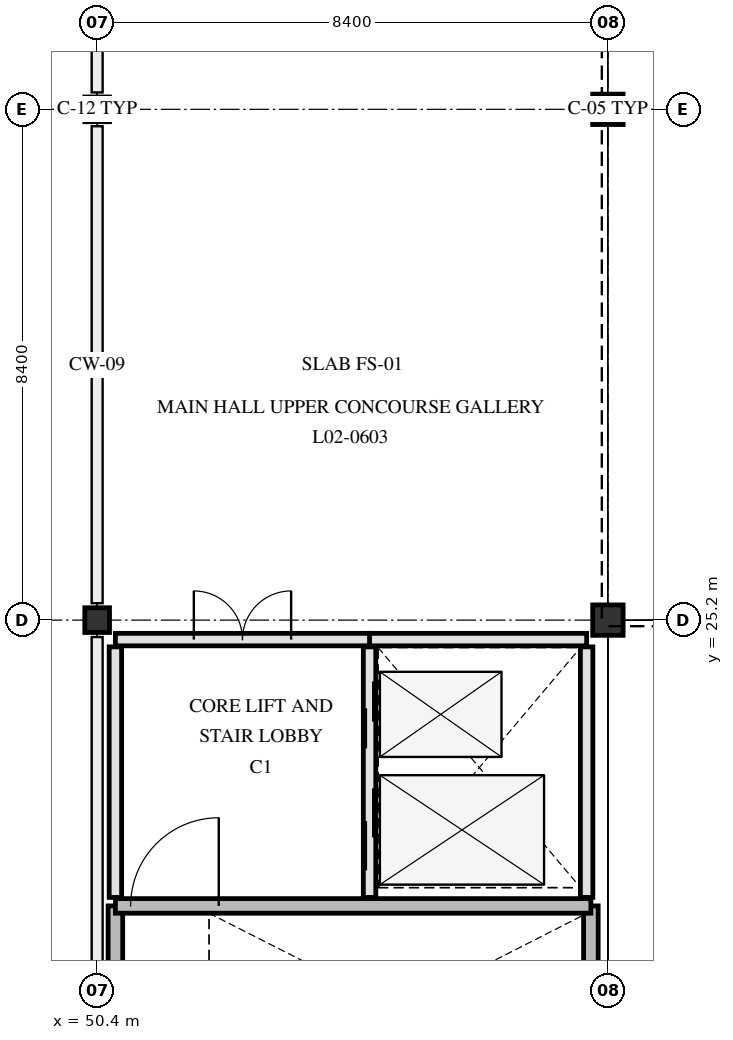
"""IFC4 building model, lengths in metres.
Left out: names, types, materials, properties, quantities, classifications, styles, units other than length and angle.
Written with IfcOpenShell. Run it as: python <this file> out.ifc"""

import sys

from ifc_helpers import new_model, si_unit, direction, frame, frame_2d, origin, origin_2d, place, context, subcontext, project, spatial, rectangle, hollow_circle, extrude, element, fill, save


model = new_model("IFC4")
c1 = context("Model", 3, precision=1e-05, world=origin(), true_north=direction((0.0, 1.0)))
c2 = subcontext(c1, "Body", "Model", "MODEL_VIEW")
j1 = project(units=[si_unit("LENGTHUNIT", "METRE"), si_unit("PLANEANGLEUNIT", "RADIAN")], contexts=[c1])
p1 = place(None, origin())
s1 = spatial("IfcSite", under=j1, at=p1, CompositionType="ELEMENT")
p2 = place(p1, origin())
s2 = spatial("IfcBuilding", under=s1, at=p2, CompositionType="ELEMENT")
p3 = place(p2, frame((0.0, 0.0, 9.3)))
s3 = spatial("IfcBuildingStorey", under=s2, at=p3, CompositionType="ELEMENT", Elevation=9.3)
for number, where, z_axis, x_axis in (
    (1, (50.4, 25.2, 0.0), (0.0, 0.0, 1.0), (1.0, 0.0, 0.0)),
    (2, (50.4, 33.6, 0.0), (0.0, 0.0, 1.0), (1.0, 0.0, 0.0)),
):
    element("IfcColumn", number, at=place(p3, frame(where, z_axis=z_axis, x_axis=x_axis)), inside=s3, PredefinedType="COLUMN", context=c2, shape_type="SweptSolid", body=[
        extrude(hollow_circle(Radius=0.203, WallThickness=0.016, at=origin_2d()), origin(), (0.0, 0.0, 1.0), 5.1),
    ])
for number, where, z_axis, x_axis in (
    (3, (58.8, 25.2, 0.0), (0.0, 0.0, 1.0), (1.0, 0.0, 0.0)),
    (4, (58.8, 33.6, 0.0), (0.0, 0.0, 1.0), (1.0, 0.0, 0.0)),
):
    element("IfcColumn", number, at=place(p3, frame(where, z_axis=z_axis, x_axis=x_axis)), inside=s3, PredefinedType="COLUMN", context=c2, shape_type="SweptSolid", body=[
        extrude(rectangle(XDim=0.5, YDim=0.5, at=origin_2d()), origin(), (0.0, 0.0, 1.0), 5.1),
    ])
for number, where, z_axis, x_axis in (
    (5, (50.7, 17.18, 0.0), (0.0, 0.0, 1.0), (0.0, 1.0, 0.0)),
    (6, (58.52, 17.18, 0.0), (0.0, 0.0, 1.0), (0.0, 1.0, 0.0)),
):
    element("IfcWall", number, at=place(p3, frame(where, z_axis=z_axis, x_axis=x_axis)), inside=s3, PredefinedType="SHEAR", context=c2, shape_type="SweptSolid", body=[
        extrude(rectangle(XDim=3.32, YDim=0.24, at=frame_2d((1.66, 0.0))), origin(), (0.0, 0.0, 1.0), 4.78),
    ])
p4 = place(p3, frame((50.7, 20.5, 0.0), z_axis=(0.0, 0.0, 1.0), x_axis=(1.0, 0.0, 0.0)))
e7 = element("IfcWall", 7, at=p4, inside=s3, PredefinedType="SHEAR", context=c2, shape_type="SweptSolid", body=[
    extrude(rectangle(XDim=7.82, YDim=0.24, at=frame_2d((3.91, 0.0))), origin(), (0.0, 0.0, 1.0), 4.78),
])
p5 = place(p4, frame((0.25, 0.0, 0.0)))
e8 = element("IfcOpeningElement", 8, at=p5, cuts=e7, PredefinedType="OPENING", context=c2, shape_type="SweptSolid", body=[
    extrude(rectangle(XDim=1.45, YDim=2.2, at=frame_2d((0.725, 1.1))), frame((0.0, 0.13, 0.0), z_axis=(0.0, -1.0, 0.0), x_axis=(1.0, 0.0, 0.0)), (0.0, 0.0, 1.0), 0.26),
])
p6 = place(p3, frame((54.88, 20.64, 0.0), z_axis=(0.0, 0.0, 1.0), x_axis=(0.0, 1.0, 0.0)))
e9 = element("IfcWall", 9, at=p6, inside=s3, PredefinedType="PARTITIONING", context=c2, shape_type="SweptSolid", body=[
    extrude(rectangle(XDim=4.12, YDim=0.205, at=frame_2d((2.06, 0.0))), origin(), (0.0, 0.0, 1.0), 4.77),
])
p7 = place(p6, frame((0.445, 0.0, 0.0)))
e10 = element("IfcOpeningElement", 10, at=p7, cuts=e9, PredefinedType="OPENING", context=c2, shape_type="SweptSolid", body=[
    extrude(rectangle(XDim=1.35, YDim=2.2, at=frame_2d((0.675, 1.1))), frame((0.0, 0.113, 0.0), z_axis=(0.0, -1.0, 0.0), x_axis=(1.0, 0.0, 0.0)), (0.0, 0.0, 1.0), 0.225),
])
p8 = place(p6, frame((2.45, 0.0, 0.0)))
e11 = element("IfcOpeningElement", 11, at=p8, cuts=e9, PredefinedType="OPENING", context=c2, shape_type="SweptSolid", body=[
    extrude(rectangle(XDim=1.1, YDim=2.15, at=frame_2d((0.55, 1.075))), frame((0.0, 0.113, 0.0), z_axis=(0.0, -1.0, 0.0), x_axis=(1.0, 0.0, 0.0)), (0.0, 0.0, 1.0), 0.225),
])
p9 = place(p3, frame((58.45, 20.64, 0.0), z_axis=(0.0, 0.0, 1.0), x_axis=(0.0, 1.0, 0.0)))
e12 = element("IfcWall", 12, at=p9, inside=s3, PredefinedType="PARTITIONING", context=c2, shape_type="SweptSolid", body=[
    extrude(rectangle(XDim=4.12, YDim=0.205, at=frame_2d((2.06, 0.0))), origin(), (0.0, 0.0, 1.0), 4.77),
])
p10 = place(p3, frame((54.88, 24.88, 0.0), z_axis=(0.0, 0.0, 1.0), x_axis=(1.0, 0.0, 0.0)))
e13 = element("IfcWall", 13, at=p10, inside=s3, PredefinedType="PARTITIONING", context=c2, shape_type="SweptSolid", body=[
    extrude(rectangle(XDim=3.57, YDim=0.205, at=frame_2d((1.785, 0.0))), origin(), (0.0, 0.0, 1.0), 4.17),
])
p11 = place(p3, frame((50.7, 20.64, 0.0), z_axis=(0.0, 0.0, 1.0), x_axis=(0.0, 1.0, 0.0)))
e14 = element("IfcWall", 14, at=p11, inside=s3, PredefinedType="PARTITIONING", context=c2, shape_type="SweptSolid", body=[
    extrude(rectangle(XDim=4.12, YDim=0.205, at=frame_2d((2.06, 0.0))), origin(), (0.0, 0.0, 1.0), 4.07),
])
p12 = place(p3, frame((50.7, 24.88, 0.0), z_axis=(0.0, 0.0, 1.0), x_axis=(1.0, 0.0, 0.0)))
e15 = element("IfcWall", 15, at=p12, inside=s3, PredefinedType="PARTITIONING", context=c2, shape_type="SweptSolid", body=[
    extrude(rectangle(XDim=4.18, YDim=0.205, at=frame_2d((2.09, 0.0))), origin(), (0.0, 0.0, 1.0), 4.17),
])
p13 = place(p12, frame((1.29, 0.0, 0.0)))
e16 = element("IfcOpeningElement", 16, at=p13, cuts=e15, PredefinedType="OPENING", context=c2, shape_type="SweptSolid", body=[
    extrude(rectangle(XDim=1.6, YDim=2.25, at=frame_2d((0.8, 1.125))), frame((0.0, 0.113, 0.0), z_axis=(0.0, -1.0, 0.0), x_axis=(1.0, 0.0, 0.0)), (0.0, 0.0, 1.0), 0.225),
])
p14 = place(p5, origin())
e17 = element("IfcDoor", 17, at=p14, inside=s3, OperationType="SINGLE_SWING_RIGHT", PredefinedType="DOOR", context=c2, shape_type="SweptSolid", body=[
    extrude(rectangle(XDim=1.45, YDim=2.2, at=frame_2d((0.725, 1.1))), frame((0.0, 0.025, 0.0), z_axis=(0.0, -1.0, 0.0), x_axis=(1.0, 0.0, 0.0)), (0.0, 0.0, 1.0), 0.05),
])
fill(e8, e17)
p15 = place(p7, origin())
e18 = element("IfcDoor", 18, at=p15, inside=s3, OperationType="SLIDING_TO_LEFT", PredefinedType="DOOR", context=c2, shape_type="SweptSolid", body=[
    extrude(rectangle(XDim=1.35, YDim=2.2, at=frame_2d((0.675, 1.1))), frame((0.0, 0.025, 0.0), z_axis=(0.0, -1.0, 0.0), x_axis=(1.0, 0.0, 0.0)), (0.0, 0.0, 1.0), 0.05),
])
fill(e10, e18)
p16 = place(p8, origin())
e19 = element("IfcDoor", 19, at=p16, inside=s3, OperationType="SLIDING_TO_LEFT", PredefinedType="DOOR", context=c2, shape_type="SweptSolid", body=[
    extrude(rectangle(XDim=1.1, YDim=2.15, at=frame_2d((0.55, 1.075))), frame((0.0, 0.025, 0.0), z_axis=(0.0, -1.0, 0.0), x_axis=(1.0, 0.0, 0.0)), (0.0, 0.0, 1.0), 0.05),
])
fill(e11, e19)
p17 = place(p13, origin())
e20 = element("IfcDoor", 20, at=p17, inside=s3, OperationType="DOUBLE_SWING_LEFT", PredefinedType="DOOR", context=c2, shape_type="SweptSolid", body=[
    extrude(rectangle(XDim=1.6, YDim=2.25, at=frame_2d((0.8, 1.125))), frame((0.0, 0.025, 0.0), z_axis=(0.0, -1.0, 0.0), x_axis=(1.0, 0.0, 0.0)), (0.0, 0.0, 1.0), 0.05),
])
fill(e16, e20)
save(model, sys.argv[1])
